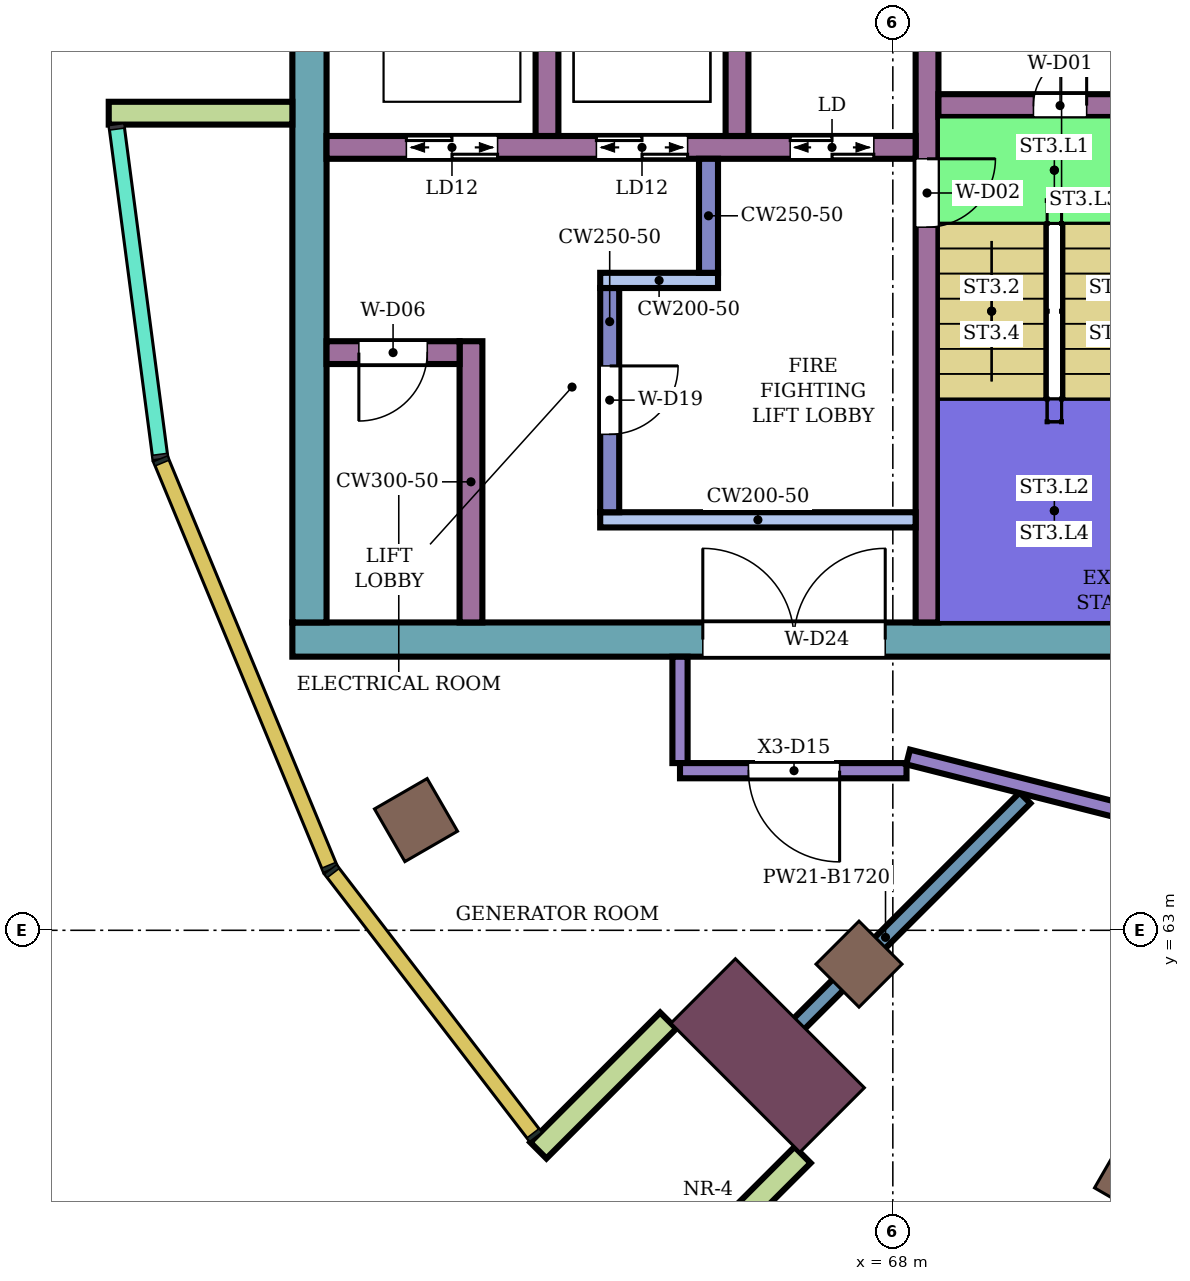
"""IFC4 building model, lengths in metres.
Left out: names, types, materials, properties, quantities, classifications, styles, units other than length and angle.
Written with IfcOpenShell. Run it as: python <this file> out.ifc"""

import sys

from ifc_helpers import new_model, si_unit, direction, frame, frame_2d, origin, origin_2d, place, context, subcontext, project, spatial, rectangle, extrude, element, fill, save


model = new_model("IFC4")
c1 = context("Model", 3, precision=1e-05, world=origin(), true_north=direction((0.0, 1.0)))
c2 = subcontext(c1, "Body", "Model", "MODEL_VIEW")
j1 = project(units=[si_unit("LENGTHUNIT", "METRE"), si_unit("PLANEANGLEUNIT", "RADIAN")], contexts=[c1])
p1 = place(None, origin())
s1 = spatial("IfcSite", under=j1, at=p1, CompositionType="ELEMENT")
p2 = place(p1, origin())
s2 = spatial("IfcBuilding", under=s1, at=p2, CompositionType="ELEMENT")
p3 = place(p2, frame((0.0, 0.0, 309.3)))
s3 = spatial("IfcBuildingStorey", under=s2, at=p3, CompositionType="ELEMENT", Elevation=309.3)
for number, where, z_axis, x_axis in (
    (1, (61.727, 64.45, 0.0), (0.0, 0.0, 1.0), (-0.866, -0.5, 0.0)),
    (2, (67.555, 62.555, 0.0), (0.0, 0.0, 1.0), (-0.707, -0.707, 0.0)),
    (3, (71.2, 59.758, 0.0), (0.0, 0.0, 1.0), (-0.5, -0.866, 0.0)),
):
    element("IfcColumn", number, at=place(p3, frame(where, z_axis=z_axis, x_axis=x_axis)), inside=s3, PredefinedType="COLUMN", context=c2, shape_type="SweptSolid", body=[
        extrude(rectangle(XDim=0.8, YDim=0.8, at=origin_2d()), origin(), (0.0, 0.0, 1.0), 5.6),
    ])
p4 = place(p3, frame((66.353, 61.353, 0.0), z_axis=(0.0, 0.0, 1.0), x_axis=(-0.707106781187, -0.707106781187, 0.0)))
e4 = element("IfcColumn", 4, at=p4, inside=s3, PredefinedType="COLUMN", context=c2, shape_type="SweptSolid", body=[
    extrude(rectangle(XDim=1.2, YDim=2.4, at=origin_2d()), origin(), (0.0, 0.0, 1.0), 5.6),
])
p5 = place(p3, frame((72.1, 66.825, 0.0), z_axis=(0.0, 0.0, 1.0), x_axis=(-1.0, 0.0, 0.0)))
e5 = element("IfcWall", 5, at=p5, inside=s3, PredefinedType="SHEAR", context=c2, shape_type="SweptSolid", body=[
    extrude(rectangle(XDim=12.0, YDim=0.45, at=frame_2d((6.0, 0.0))), origin(), (0.0, 0.0, 1.0), 5.28),
])
p6 = place(p5, frame((4.2, 0.0, 0.0)))
e6 = element("IfcOpeningElement", 6, at=p6, cuts=e5, PredefinedType="OPENING", context=c2, shape_type="SweptSolid", body=[
    extrude(rectangle(XDim=2.4, YDim=2.4, at=frame_2d((1.2, 1.2))), frame((0.0, 0.235, 0.0), z_axis=(0.0, -1.0, 0.0), x_axis=(1.0, 0.0, 0.0)), (0.0, 0.0, 1.0), 0.47),
])
p7 = place(p3, frame((60.325, 76.4, 0.0), z_axis=(0.0, 0.0, 1.0), x_axis=(0.0, -1.0, 0.0)))
e7 = element("IfcWall", 7, at=p7, inside=s3, PredefinedType="SHEAR", context=c2, shape_type="SweptSolid", body=[
    extrude(rectangle(XDim=9.35, YDim=0.45, at=frame_2d((4.675, 0.0))), origin(), (0.0, 0.0, 1.0), 5.28),
])
p8 = place(p3, frame((68.45, 75.0, 0.0), z_axis=(0.0, 0.0, 1.0), x_axis=(0.0, -1.0, 0.0)))
e8 = element("IfcWall", 8, at=p8, inside=s3, PredefinedType="SHEAR", context=c2, shape_type="SweptSolid", body=[
    extrude(rectangle(XDim=7.95, YDim=0.3, at=frame_2d((3.975, 0.0))), origin(), (0.0, 0.0, 1.0), 5.28),
])
p9 = place(p8, frame((1.85, 0.0, 0.0)))
e9 = element("IfcOpeningElement", 9, at=p9, cuts=e8, PredefinedType="OPENING", context=c2, shape_type="SweptSolid", body=[
    extrude(rectangle(XDim=0.9, YDim=2.1, at=frame_2d((0.45, 1.05))), frame((0.0, 0.16, 0.0), z_axis=(0.0, -1.0, 0.0), x_axis=(1.0, 0.0, 0.0)), (0.0, 0.0, 1.0), 0.32),
])
p10 = place(p3, frame((71.65, 73.85, 0.0), z_axis=(0.0, 0.0, 1.0), x_axis=(-1.0, 0.0, 0.0)))
e10 = element("IfcWall", 10, at=p10, inside=s3, PredefinedType="SHEAR", context=c2, shape_type="SweptSolid", body=[
    extrude(rectangle(XDim=3.05, YDim=0.3, at=frame_2d((1.525, 0.0))), origin(), (0.0, 0.0, 1.0), 5.28),
])
p11 = place(p10, frame((1.1, 0.0, 0.0)))
e11 = element("IfcOpeningElement", 11, at=p11, cuts=e10, PredefinedType="OPENING", context=c2, shape_type="SweptSolid", body=[
    extrude(rectangle(XDim=0.7, YDim=2.0, at=frame_2d((0.35, 1.0))), frame((0.0, 0.16, 0.0), z_axis=(0.0, -1.0, 0.0), x_axis=(1.0, 0.0, 0.0)), (0.0, 0.0, 1.0), 0.32),
])
p12 = place(p3, frame((68.3, 73.3, 0.0), z_axis=(0.0, 0.0, 1.0), x_axis=(-1.0, 0.0, 0.0)))
e12 = element("IfcWall", 12, at=p12, inside=s3, PredefinedType="SHEAR", context=c2, shape_type="SweptSolid", body=[
    extrude(rectangle(XDim=7.75, YDim=0.3, at=frame_2d((3.875, 0.0))), origin(), (0.0, 0.0, 1.0), 5.28),
])
p13 = place(p12, frame((0.55, 0.0, 0.0)))
e13 = element("IfcOpeningElement", 13, at=p13, cuts=e12, PredefinedType="OPENING", context=c2, shape_type="SweptSolid", body=[
    extrude(rectangle(XDim=1.1, YDim=2.1, at=frame_2d((0.55, 1.05))), frame((0.0, 0.16, 0.0), z_axis=(0.0, -1.0, 0.0), x_axis=(1.0, 0.0, 0.0)), (0.0, 0.0, 1.0), 0.32),
])
p14 = place(p12, frame((3.0, 0.0, 0.0)))
e14 = element("IfcOpeningElement", 14, at=p14, cuts=e12, PredefinedType="OPENING", context=c2, shape_type="SweptSolid", body=[
    extrude(rectangle(XDim=1.2, YDim=2.1, at=frame_2d((0.6, 1.05))), frame((0.0, 0.16, 0.0), z_axis=(0.0, -1.0, 0.0), x_axis=(1.0, 0.0, 0.0)), (0.0, 0.0, 1.0), 0.32),
])
p15 = place(p12, frame((5.5, 0.0, 0.0)))
e15 = element("IfcOpeningElement", 15, at=p15, cuts=e12, PredefinedType="OPENING", context=c2, shape_type="SweptSolid", body=[
    extrude(rectangle(XDim=1.2, YDim=2.1, at=frame_2d((0.6, 1.05))), frame((0.0, 0.16, 0.0), z_axis=(0.0, -1.0, 0.0), x_axis=(1.0, 0.0, 0.0)), (0.0, 0.0, 1.0), 0.32),
])
for number, where, z_axis, x_axis in (
    (16, (65.95, 76.0, 0.0), (0.0, 0.0, 1.0), (0.0, -1.0, 0.0)),
    (17, (63.45, 76.0, 0.0), (0.0, 0.0, 1.0), (0.0, -1.0, 0.0)),
):
    element("IfcWall", number, at=place(p3, frame(where, z_axis=z_axis, x_axis=x_axis)), inside=s3, PredefinedType="SHEAR", context=c2, shape_type="SweptSolid", body=[
        extrude(rectangle(XDim=2.55, YDim=0.3, at=frame_2d((1.275, 0.0))), origin(), (0.0, 0.0, 1.0), 5.28),
    ])
p16 = place(p3, frame((68.3, 68.4, 0.0), z_axis=(0.0, 0.0, 1.0), x_axis=(-1.0, 0.0, 0.0)))
e18 = element("IfcWall", 18, at=p16, inside=s3, PredefinedType="SHEAR", context=c2, shape_type="SweptSolid", body=[
    extrude(rectangle(XDim=4.15, YDim=0.2, at=frame_2d((2.075, 0.0))), origin(), (0.0, 0.0, 1.0), 5.28),
])
p17 = place(p3, frame((64.275, 71.45, 0.0), z_axis=(0.0, 0.0, 1.0), x_axis=(0.0, -1.0, 0.0)))
e19 = element("IfcWall", 19, at=p17, inside=s3, PredefinedType="SHEAR", context=c2, shape_type="SweptSolid", body=[
    extrude(rectangle(XDim=2.95, YDim=0.25, at=frame_2d((1.475, 0.0))), origin(), (0.0, 0.0, 1.0), 5.28),
])
p18 = place(p17, frame((1.025, 0.0, 0.0)))
e20 = element("IfcOpeningElement", 20, at=p18, cuts=e19, PredefinedType="OPENING", context=c2, shape_type="SweptSolid", body=[
    extrude(rectangle(XDim=0.9, YDim=2.1, at=frame_2d((0.45, 1.05))), frame((0.0, 0.135, 0.0), z_axis=(0.0, -1.0, 0.0), x_axis=(1.0, 0.0, 0.0)), (0.0, 0.0, 1.0), 0.27),
])
p19 = place(p3, frame((65.7, 71.55, 0.0), z_axis=(0.0, 0.0, 1.0), x_axis=(-1.0, 0.0, 0.0)))
e21 = element("IfcWall", 21, at=p19, inside=s3, PredefinedType="SHEAR", context=c2, shape_type="SweptSolid", body=[
    extrude(rectangle(XDim=1.55, YDim=0.2, at=frame_2d((0.775, 0.0))), origin(), (0.0, 0.0, 1.0), 5.28),
])
p20 = place(p3, frame((65.575, 73.15, 0.0), z_axis=(0.0, 0.0, 1.0), x_axis=(0.0, -1.0, 0.0)))
e22 = element("IfcWall", 22, at=p20, inside=s3, PredefinedType="SHEAR", context=c2, shape_type="SweptSolid", body=[
    extrude(rectangle(XDim=1.5, YDim=0.25, at=frame_2d((0.75, 0.0))), origin(), (0.0, 0.0, 1.0), 5.28),
])
p21 = place(p3, frame((62.45, 70.75, 0.0), z_axis=(0.0, 0.0, 1.0), x_axis=(0.0, -1.0, 0.0)))
e23 = element("IfcWall", 23, at=p21, inside=s3, PredefinedType="SHEAR", context=c2, shape_type="SweptSolid", body=[
    extrude(rectangle(XDim=3.7, YDim=0.3, at=frame_2d((1.85, 0.0))), origin(), (0.0, 0.0, 1.0), 5.28),
])
p22 = place(p3, frame((62.3, 70.6, 0.0), z_axis=(0.0, 0.0, 1.0), x_axis=(-1.0, 0.0, 0.0)))
e24 = element("IfcWall", 24, at=p22, inside=s3, PredefinedType="SHEAR", context=c2, shape_type="SweptSolid", body=[
    extrude(rectangle(XDim=1.75, YDim=0.3, at=frame_2d((0.875, 0.0))), origin(), (0.0, 0.0, 1.0), 5.28),
])
p23 = place(p22, frame((0.425, 0.0, 0.0)))
e25 = element("IfcOpeningElement", 25, at=p23, cuts=e24, PredefinedType="OPENING", context=c2, shape_type="SweptSolid", body=[
    extrude(rectangle(XDim=0.9, YDim=2.1, at=frame_2d((0.45, 1.05))), frame((0.0, 0.16, 0.0), z_axis=(0.0, -1.0, 0.0), x_axis=(1.0, 0.0, 0.0)), (0.0, 0.0, 1.0), 0.32),
])
for number, where, z_axis, x_axis in (
    (26, (60.1, 73.75, 0.0), (0.0, 0.0, 1.0), (-1.0, 0.0, 0.0)),
    (27, (65.045, 61.812, 0.0), (0.0, 0.0, 1.0), (-0.707, -0.707, 0.0)),
    (28, (66.812, 60.045, 0.0), (0.0, 0.0, 1.0), (-0.707, -0.707, 0.0)),
):
    element("IfcWall", number, at=place(p3, frame(where, z_axis=z_axis, x_axis=x_axis)), inside=s3, PredefinedType="NOTDEFINED", context=c2, shape_type="SweptSolid", body=[
        extrude(rectangle(XDim=2.416, YDim=0.3, at=frame_2d((1.208, 0.0))), origin(), (0.0, 0.0, 1.0), 5.6),
    ])
p24 = place(p3, frame((65.2, 65.2, 0.0), z_axis=(0.0, 0.0, 1.0), x_axis=(0.0, 1.0, 0.0)))
e29 = element("IfcWall", 29, at=p24, inside=s3, PredefinedType="PARTITIONING", context=c2, shape_type="SweptSolid", body=[
    extrude(rectangle(XDim=1.399, YDim=0.2, at=frame_2d((0.7, 0.0))), origin(), (0.0, 0.0, 1.0), 5.15),
])
p25 = place(p3, frame((65.2, 65.1, 0.0), z_axis=(0.0, 0.0, 1.0), x_axis=(1.0, 0.0, 0.0)))
e30 = element("IfcWall", 30, at=p25, inside=s3, PredefinedType="PARTITIONING", context=c2, shape_type="SweptSolid", body=[
    extrude(rectangle(XDim=2.98, YDim=0.2, at=frame_2d((1.49, 0.0))), origin(), (0.0, 0.0, 1.0), 5.15),
])
p26 = place(p25, frame((0.9, 0.0, 0.0)))
e31 = element("IfcOpeningElement", 31, at=p26, cuts=e30, PredefinedType="OPENING", context=c2, shape_type="SweptSolid", body=[
    extrude(rectangle(XDim=1.2, YDim=2.4, at=frame_2d((0.6, 1.2))), frame((0.0, 0.11, 0.0), z_axis=(0.0, -1.0, 0.0), x_axis=(1.0, 0.0, 0.0)), (0.0, 0.0, 1.0), 0.22),
])
p27 = place(p3, frame((66.069, 61.073, 0.0), z_axis=(0.0, 0.0, 1.0), x_axis=(0.707200867644, 0.707012682208, 0.0)))
e32 = element("IfcWall", 32, at=p27, inside=s3, PredefinedType="PARTITIONING", context=c2, shape_type="SweptSolid", body=[
    extrude(rectangle(XDim=5.189, YDim=0.2, at=frame_2d((2.595, 0.0))), origin(), (0.0, 0.0, 1.0), 3.88),
])
p28 = place(p3, frame((68.201, 65.28, 0.0), z_axis=(0.0, 0.0, 1.0), x_axis=(0.969440682923, -0.245325828836, 0.0)))
e33 = element("IfcWall", 33, at=p28, inside=s3, PredefinedType="PARTITIONING", context=c2, shape_type="SweptSolid", body=[
    extrude(rectangle(XDim=5.927, YDim=0.2, at=frame_2d((2.964, 0.0))), origin(), (0.0, 0.0, 1.0), 5.15),
])
p29 = place(p28, frame((3.258, 0.0, 0.0)))
e34 = element("IfcOpeningElement", 34, at=p29, cuts=e33, PredefinedType="OPENING", context=c2, shape_type="SweptSolid", body=[
    extrude(rectangle(XDim=1.1, YDim=2.1, at=frame_2d((0.55, 1.05))), frame((0.0, 0.11, 0.0), z_axis=(0.0, -1.0, 0.0), x_axis=(1.0, 0.0, 0.0)), (0.0, 0.0, 1.0), 0.22),
])
p30 = place(p26, frame((1.2, 0.0, 0.0), z_axis=(0.0, 0.0, 1.0), x_axis=(-1.0, 0.0, 0.0)))
e35 = element("IfcDoor", 35, at=p30, inside=s3, OperationType="SINGLE_SWING_LEFT", PredefinedType="DOOR", context=c2, shape_type="SweptSolid", body=[
    extrude(rectangle(XDim=1.2, YDim=2.4, at=frame_2d((0.6, 1.2))), frame((0.0, 0.025, 0.0), z_axis=(0.0, -1.0, 0.0), x_axis=(1.0, 0.0, 0.0)), (0.0, 0.0, 1.0), 0.05),
])
fill(e31, e35)
p31 = place(p11, frame((0.7, 0.0, 0.0), z_axis=(0.0, 0.0, 1.0), x_axis=(-1.0, 0.0, 0.0)))
e36 = element("IfcDoor", 36, at=p31, inside=s3, OperationType="SINGLE_SWING_RIGHT", PredefinedType="DOOR", context=c2, shape_type="SweptSolid", body=[
    extrude(rectangle(XDim=0.7, YDim=2.0, at=frame_2d((0.35, 1.0))), frame((0.0, 0.025, 0.0), z_axis=(0.0, -1.0, 0.0), x_axis=(1.0, 0.0, 0.0)), (0.0, 0.0, 1.0), 0.05),
])
fill(e11, e36)
p32 = place(p9, origin())
e37 = element("IfcDoor", 37, at=p32, inside=s3, OperationType="SINGLE_SWING_LEFT", PredefinedType="DOOR", context=c2, shape_type="SweptSolid", body=[
    extrude(rectangle(XDim=0.9, YDim=2.1, at=frame_2d((0.45, 1.05))), frame((0.0, 0.025, 0.0), z_axis=(0.0, -1.0, 0.0), x_axis=(1.0, 0.0, 0.0)), (0.0, 0.0, 1.0), 0.05),
])
fill(e9, e37)
p33 = place(p13, origin())
e38 = element("IfcDoor", 38, at=p33, inside=s3, OperationType="DOUBLE_DOOR_SLIDING", PredefinedType="DOOR", context=c2, shape_type="SweptSolid", body=[
    extrude(rectangle(XDim=1.1, YDim=2.1, at=frame_2d((0.55, 1.05))), frame((0.0, 0.025, 0.0), z_axis=(0.0, -1.0, 0.0), x_axis=(1.0, 0.0, 0.0)), (0.0, 0.0, 1.0), 0.05),
])
fill(e13, e38)
p34 = place(p14, origin())
e39 = element("IfcDoor", 39, at=p34, inside=s3, OperationType="DOUBLE_DOOR_SLIDING", PredefinedType="DOOR", context=c2, shape_type="SweptSolid", body=[
    extrude(rectangle(XDim=1.2, YDim=2.1, at=frame_2d((0.6, 1.05))), frame((0.0, 0.025, 0.0), z_axis=(0.0, -1.0, 0.0), x_axis=(1.0, 0.0, 0.0)), (0.0, 0.0, 1.0), 0.05),
])
fill(e14, e39)
p35 = place(p15, origin())
e40 = element("IfcDoor", 40, at=p35, inside=s3, OperationType="DOUBLE_DOOR_SLIDING", PredefinedType="DOOR", context=c2, shape_type="SweptSolid", body=[
    extrude(rectangle(XDim=1.2, YDim=2.1, at=frame_2d((0.6, 1.05))), frame((0.0, 0.025, 0.0), z_axis=(0.0, -1.0, 0.0), x_axis=(1.0, 0.0, 0.0)), (0.0, 0.0, 1.0), 0.05),
])
fill(e15, e40)
p36 = place(p18, origin())
e41 = element("IfcDoor", 41, at=p36, inside=s3, OperationType="SINGLE_SWING_LEFT", PredefinedType="DOOR", context=c2, shape_type="SweptSolid", body=[
    extrude(rectangle(XDim=0.9, YDim=2.1, at=frame_2d((0.45, 1.05))), frame((0.0, 0.025, 0.0), z_axis=(0.0, -1.0, 0.0), x_axis=(1.0, 0.0, 0.0)), (0.0, 0.0, 1.0), 0.05),
])
fill(e20, e41)
p37 = place(p23, origin())
e42 = element("IfcDoor", 42, at=p37, inside=s3, OperationType="SINGLE_SWING_RIGHT", PredefinedType="DOOR", context=c2, shape_type="SweptSolid", body=[
    extrude(rectangle(XDim=0.9, YDim=2.1, at=frame_2d((0.45, 1.05))), frame((0.0, 0.025, 0.0), z_axis=(0.0, -1.0, 0.0), x_axis=(1.0, 0.0, 0.0)), (0.0, 0.0, 1.0), 0.05),
])
fill(e25, e42)
p38 = place(p6, frame((2.4, 0.0, 0.0), z_axis=(0.0, 0.0, 1.0), x_axis=(-1.0, 0.0, 0.0)))
e43 = element("IfcDoor", 43, at=p38, inside=s3, OperationType="DOUBLE_DOOR_SINGLE_SWING", PredefinedType="DOOR", context=c2, shape_type="SweptSolid", body=[
    extrude(rectangle(XDim=2.4, YDim=2.4, at=frame_2d((1.2, 1.2))), frame((0.0, 0.025, 0.0), z_axis=(0.0, -1.0, 0.0), x_axis=(1.0, 0.0, 0.0)), (0.0, 0.0, 1.0), 0.05),
])
fill(e6, e43)
save(model, sys.argv[1])
